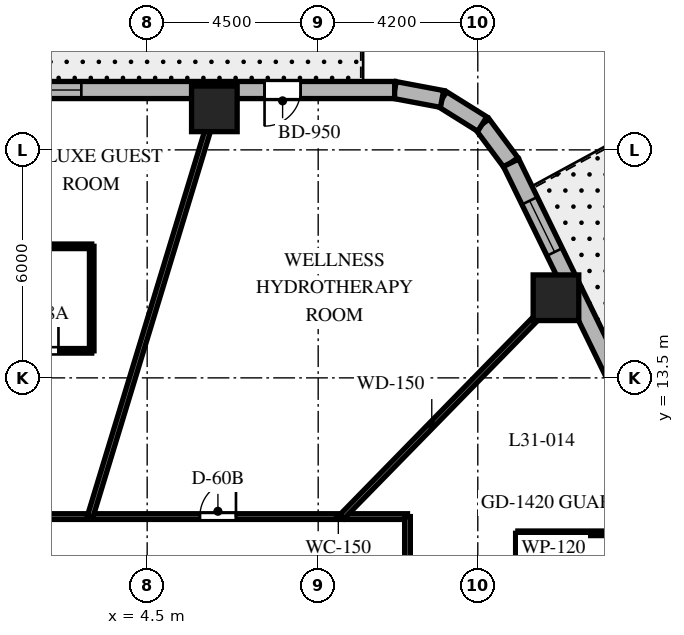
"""IFC4 building model, lengths in metres.
Left out: names, types, materials, properties, quantities, classifications, styles, units other than length and angle.
Written with IfcOpenShell. Run it as: python <this file> out.ifc"""

import sys

from ifc_helpers import new_model, si_unit, direction, frame, frame_2d, origin, origin_2d, place, context, subcontext, project, spatial, rectangle, extrude, element, fill, save


model = new_model("IFC4")
c1 = context("Model", 3, precision=1e-05, world=origin(), true_north=direction((0.0, 1.0)))
c2 = subcontext(c1, "Body", "Model", "MODEL_VIEW")
j1 = project(units=[si_unit("LENGTHUNIT", "METRE"), si_unit("PLANEANGLEUNIT", "RADIAN")], contexts=[c1])
p1 = place(None, origin())
s1 = spatial("IfcSite", under=j1, at=p1, CompositionType="ELEMENT")
p2 = place(p1, origin())
s2 = spatial("IfcBuilding", under=s1, at=p2, CompositionType="ELEMENT")
p3 = place(p2, frame((0.0, 0.0, 128.4)))
s3 = spatial("IfcBuildingStorey", under=s2, at=p3, CompositionType="ELEMENT", Elevation=128.4)
for number, where, z_axis, x_axis in (
    (1, (15.257, 15.609, 0.0), (0.0, 0.0, 1.0), (1.0, 0.0, 0.0)),
    (2, (6.268, 20.58, 0.0), (0.0, 0.0, 1.0), (1.0, 0.0, 0.0)),
):
    element("IfcColumn", number, at=place(p3, frame(where, z_axis=z_axis, x_axis=x_axis)), inside=s3, PredefinedType="COLUMN", context=c2, shape_type="SweptSolid", body=[
        extrude(rectangle(XDim=1.2, YDim=1.2, at=origin_2d()), origin(), (0.0, 0.0, 1.0), 3.7),
    ])
p4 = place(p3, frame((14.076, 19.161, 0.0), z_axis=(0.0, 0.0, 1.0), x_axis=(-0.597226657159, 0.802072515412, 0.0)))
e3 = element("IfcWall", 3, at=p4, inside=s3, PredefinedType="SOLIDWALL", context=c2, shape_type="SweptSolid", body=[
    extrude(rectangle(XDim=1.269, YDim=0.45, at=frame_2d((0.635, 0.0))), origin(), (0.0, 0.0, 1.0), 3.4),
])
p5 = place(p3, frame((13.318, 20.179, 0.0), z_axis=(0.0, 0.0, 1.0), x_axis=(-0.848031272749, 0.529946186362, 0.0)))
e4 = element("IfcWall", 4, at=p5, inside=s3, PredefinedType="SOLIDWALL", context=c2, shape_type="SweptSolid", body=[
    extrude(rectangle(XDim=1.248, YDim=0.45, at=frame_2d((0.624, 0.0))), origin(), (0.0, 0.0, 1.0), 3.4),
])
p6 = place(p3, frame((12.259, 20.84, 0.0), z_axis=(0.0, 0.0, 1.0), x_axis=(-0.982730354425, 0.185043374624, 0.0)))
e5 = element("IfcWall", 5, at=p6, inside=s3, PredefinedType="SOLIDWALL", context=c2, shape_type="SweptSolid", body=[
    extrude(rectangle(XDim=1.269, YDim=0.45, at=frame_2d((0.635, 0.0))), origin(), (0.0, 0.0, 1.0), 3.4),
])
p7 = place(p3, frame((22.238, 2.427, 0.0), z_axis=(0.0, 0.0, 1.0), x_axis=(-0.438374803278, 0.898792262901, 0.0)))
e6 = element("IfcWall", 6, at=p7, inside=s3, PredefinedType="SOLIDWALL", context=c2, shape_type="SweptSolid", body=[
    extrude(rectangle(XDim=18.618, YDim=0.45, at=frame_2d((9.309, 0.0))), origin(), (0.0, 0.0, 1.0), 3.4),
])
p8 = place(p7, frame((4.62, 0.0, 0.0)))
e7 = element("IfcOpeningElement", 7, at=p8, cuts=e6, PredefinedType="OPENING", context=c2, shape_type="SweptSolid", body=[
    extrude(rectangle(XDim=1.0, YDim=2.15, at=frame_2d((0.5, 1.075))), frame((0.0, 0.235, 0.0), z_axis=(0.0, -1.0, 0.0), x_axis=(1.0, 0.0, 0.0)), (0.0, 0.0, 1.0), 0.47),
])
p9 = place(p7, frame((8.61, 0.0, 0.8)))
e8 = element("IfcOpeningElement", 8, at=p9, cuts=e6, PredefinedType="OPENING", context=c2, shape_type="SweptSolid", body=[
    extrude(rectangle(XDim=1.5, YDim=1.8, at=frame_2d((0.75, 0.9))), frame((0.0, 0.235, 0.0), z_axis=(0.0, -1.0, 0.0), x_axis=(1.0, 0.0, 0.0)), (0.0, 0.0, 1.0), 0.47),
])
p10 = place(p7, frame((16.006, 0.0, 0.8)))
e9 = element("IfcOpeningElement", 9, at=p10, cuts=e6, PredefinedType="OPENING", context=c2, shape_type="SweptSolid", body=[
    extrude(rectangle(XDim=1.5, YDim=1.8, at=frame_2d((0.75, 0.9))), frame((0.0, 0.235, 0.0), z_axis=(0.0, -1.0, 0.0), x_axis=(1.0, 0.0, 0.0)), (0.0, 0.0, 1.0), 0.47),
])
p11 = place(p7, frame((1.163, 0.0, 0.8)))
e10 = element("IfcOpeningElement", 10, at=p11, cuts=e6, PredefinedType="OPENING", context=c2, shape_type="SweptSolid", body=[
    extrude(rectangle(XDim=1.5, YDim=1.8, at=frame_2d((0.75, 0.9))), frame((0.0, 0.235, 0.0), z_axis=(0.0, -1.0, 0.0), x_axis=(1.0, 0.0, 0.0)), (0.0, 0.0, 1.0), 0.47),
])
p12 = place(p3, frame((11.012, 21.075, 0.0), z_axis=(0.0, 0.0, 1.0), x_axis=(-1.0, 0.0, 0.0)))
e11 = element("IfcWall", 11, at=p12, inside=s3, PredefinedType="SOLIDWALL", context=c2, shape_type="SweptSolid", body=[
    extrude(rectangle(XDim=23.782, YDim=0.45, at=frame_2d((11.891, 0.0))), origin(), (0.0, 0.0, 1.0), 3.4),
])
p13 = place(p12, frame((2.473, 0.0, 0.0)))
e12 = element("IfcOpeningElement", 12, at=p13, cuts=e11, PredefinedType="OPENING", context=c2, shape_type="SweptSolid", body=[
    extrude(rectangle(XDim=0.95, YDim=2.15, at=frame_2d((0.475, 1.075))), frame((0.0, 0.235, 0.0), z_axis=(0.0, -1.0, 0.0), x_axis=(1.0, 0.0, 0.0)), (0.0, 0.0, 1.0), 0.47),
])
p14 = place(p12, frame((8.244, 0.0, 0.8)))
e13 = element("IfcOpeningElement", 13, at=p14, cuts=e11, PredefinedType="OPENING", context=c2, shape_type="SweptSolid", body=[
    extrude(rectangle(XDim=1.5, YDim=1.8, at=frame_2d((0.75, 0.9))), frame((0.0, 0.235, 0.0), z_axis=(0.0, -1.0, 0.0), x_axis=(1.0, 0.0, 0.0)), (0.0, 0.0, 1.0), 0.47),
])
p15 = place(p12, frame((14.811, 0.0, 0.8)))
e14 = element("IfcOpeningElement", 14, at=p15, cuts=e11, PredefinedType="OPENING", context=c2, shape_type="SweptSolid", body=[
    extrude(rectangle(XDim=1.5, YDim=1.8, at=frame_2d((0.75, 0.9))), frame((0.0, 0.235, 0.0), z_axis=(0.0, -1.0, 0.0), x_axis=(1.0, 0.0, 0.0)), (0.0, 0.0, 1.0), 0.47),
])
p16 = place(p12, frame((20.741, 0.0, 0.8)))
e15 = element("IfcOpeningElement", 15, at=p16, cuts=e11, PredefinedType="OPENING", context=c2, shape_type="SweptSolid", body=[
    extrude(rectangle(XDim=1.5, YDim=1.8, at=frame_2d((0.75, 0.9))), frame((0.0, 0.235, 0.0), z_axis=(0.0, -1.0, 0.0), x_axis=(1.0, 0.0, 0.0)), (0.0, 0.0, 1.0), 0.47),
])
p17 = place(p3, frame((-11.35, 9.85, 0.0), z_axis=(0.0, 0.0, 1.0), x_axis=(1.0, 0.0, 0.0)))
e16 = element("IfcWall", 16, at=p17, inside=s3, PredefinedType="PARTITIONING", context=c2, shape_type="SweptSolid", body=[
    extrude(rectangle(XDim=22.7, YDim=0.15, at=frame_2d((11.35, 0.0))), origin(), (0.0, 0.0, 1.0), 2.84),
])
p18 = place(p17, frame((17.237, 0.0, 0.0)))
e17 = element("IfcOpeningElement", 17, at=p18, cuts=e16, PredefinedType="OPENING", context=c2, shape_type="SweptSolid", body=[
    extrude(rectangle(XDim=0.95, YDim=2.03, at=frame_2d((0.475, 1.015))), frame((0.0, 0.085, 0.0), z_axis=(0.0, -1.0, 0.0), x_axis=(1.0, 0.0, 0.0)), (0.0, 0.0, 1.0), 0.17),
])
p19 = place(p17, frame((11.994, 0.0, 0.0)))
e18 = element("IfcOpeningElement", 18, at=p19, cuts=e16, PredefinedType="OPENING", context=c2, shape_type="SweptSolid", body=[
    extrude(rectangle(XDim=0.95, YDim=2.03, at=frame_2d((0.475, 1.015))), frame((0.0, 0.085, 0.0), z_axis=(0.0, -1.0, 0.0), x_axis=(1.0, 0.0, 0.0)), (0.0, 0.0, 1.0), 0.17),
])
p20 = place(p17, frame((8.559, 0.0, 0.0)))
e19 = element("IfcOpeningElement", 19, at=p20, cuts=e16, PredefinedType="OPENING", context=c2, shape_type="SweptSolid", body=[
    extrude(rectangle(XDim=0.95, YDim=2.03, at=frame_2d((0.475, 1.015))), frame((0.0, 0.085, 0.0), z_axis=(0.0, -1.0, 0.0), x_axis=(1.0, 0.0, 0.0)), (0.0, 0.0, 1.0), 0.17),
])
p21 = place(p17, frame((3.399, 0.0, 0.0)))
e20 = element("IfcOpeningElement", 20, at=p21, cuts=e16, PredefinedType="OPENING", context=c2, shape_type="SweptSolid", body=[
    extrude(rectangle(XDim=0.95, YDim=2.03, at=frame_2d((0.475, 1.015))), frame((0.0, 0.085, 0.0), z_axis=(0.0, -1.0, 0.0), x_axis=(1.0, 0.0, 0.0)), (0.0, 0.0, 1.0), 0.17),
])
p22 = place(p3, frame((11.35, 9.85, 0.0), z_axis=(0.0, 0.0, 1.0), x_axis=(0.0, -1.0, 0.0)))
e21 = element("IfcWall", 21, at=p22, inside=s3, PredefinedType="PARTITIONING", context=c2, shape_type="SweptSolid", body=[
    extrude(rectangle(XDim=19.7, YDim=0.15, at=frame_2d((9.85, 0.0))), origin(), (0.0, 0.0, 1.0), 2.84),
])
p23 = place(p22, frame((3.008, 0.0, 0.0)))
e22 = element("IfcOpeningElement", 22, at=p23, cuts=e21, PredefinedType="OPENING", context=c2, shape_type="SweptSolid", body=[
    extrude(rectangle(XDim=0.95, YDim=2.03, at=frame_2d((0.475, 1.015))), frame((0.0, 0.085, 0.0), z_axis=(0.0, -1.0, 0.0), x_axis=(1.0, 0.0, 0.0)), (0.0, 0.0, 1.0), 0.17),
])
p24 = place(p22, frame((15.205, 0.0, 0.0)))
e23 = element("IfcOpeningElement", 23, at=p24, cuts=e21, PredefinedType="OPENING", context=c2, shape_type="SweptSolid", body=[
    extrude(rectangle(XDim=0.95, YDim=2.03, at=frame_2d((0.475, 1.015))), frame((0.0, 0.085, 0.0), z_axis=(0.0, -1.0, 0.0), x_axis=(1.0, 0.0, 0.0)), (0.0, 0.0, 1.0), 0.17),
])
p25 = place(p22, frame((8.836, 0.0, 0.0)))
e24 = element("IfcOpeningElement", 24, at=p25, cuts=e21, PredefinedType="OPENING", context=c2, shape_type="SweptSolid", body=[
    extrude(rectangle(XDim=0.95, YDim=2.03, at=frame_2d((0.475, 1.015))), frame((0.0, 0.085, 0.0), z_axis=(0.0, -1.0, 0.0), x_axis=(1.0, 0.0, 0.0)), (0.0, 0.0, 1.0), 0.17),
])
p26 = place(p3, frame((9.628, 9.85, 0.0), z_axis=(0.0, 0.0, 1.0), x_axis=(0.698992824326, 0.715128681805, 0.0)))
e25 = element("IfcWall", 25, at=p26, inside=s3, PredefinedType="PARTITIONING", context=c2, shape_type="SweptSolid", body=[
    extrude(rectangle(XDim=8.579, YDim=0.15, at=frame_2d((4.29, 0.0))), origin(), (0.0, 0.0, 1.0), 2.54),
])
p27 = place(p3, frame((3.0, 9.85, 0.0), z_axis=(0.0, 0.0, 1.0), x_axis=(0.291352035382, 0.95661590593, 0.0)))
e26 = element("IfcWall", 26, at=p27, inside=s3, PredefinedType="PARTITIONING", context=c2, shape_type="SweptSolid", body=[
    extrude(rectangle(XDim=11.734, YDim=0.15, at=frame_2d((5.867, 0.0))), origin(), (0.0, 0.0, 1.0), 2.54),
])
p28 = place(p3, frame((16.695, 9.41, 0.0), z_axis=(0.0, 0.0, 1.0), x_axis=(-1.0, 0.0, 0.0)))
e27 = element("IfcWall", 27, at=p28, inside=s3, PredefinedType="PARTITIONING", context=c2, shape_type="SweptSolid", body=[
    extrude(rectangle(XDim=2.44, YDim=0.12, at=frame_2d((1.22, 0.0))), origin(), (0.0, 0.0, 1.0), 2.927),
])
p29 = place(p3, frame((14.255, 9.41, 0.0), z_axis=(0.0, 0.0, 1.0), x_axis=(0.0, -1.0, 0.0)))
e28 = element("IfcWall", 28, at=p29, inside=s3, PredefinedType="PARTITIONING", context=c2, shape_type="SweptSolid", body=[
    extrude(rectangle(XDim=2.61, YDim=0.12, at=frame_2d((1.305, 0.0))), origin(), (0.0, 0.0, 1.0), 3.4),
])
p30 = place(p3, frame((0.441, 14.212, 0.0), z_axis=(0.0, 0.0, 1.0), x_axis=(1.0, 0.0, 0.0)))
e29 = element("IfcWall", 29, at=p30, inside=s3, PredefinedType="PARTITIONING", context=c2, shape_type="SweptSolid", body=[
    extrude(rectangle(XDim=2.6, YDim=0.12, at=frame_2d((1.3, 0.0))), origin(), (0.0, 0.0, 1.0), 3.4),
])
p31 = place(p30, frame((0.875, 0.0, 0.0)))
e30 = element("IfcOpeningElement", 30, at=p31, cuts=e29, PredefinedType="OPENING", context=c2, shape_type="SweptSolid", body=[
    extrude(rectangle(XDim=0.85, YDim=2.03, at=frame_2d((0.425, 1.015))), frame((0.0, 0.07, 0.0), z_axis=(0.0, -1.0, 0.0), x_axis=(1.0, 0.0, 0.0)), (0.0, 0.0, 1.0), 0.14),
])
p32 = place(p3, frame((3.041, 14.212, 0.0), z_axis=(0.0, 0.0, 1.0), x_axis=(0.0, 1.0, 0.0)))
e31 = element("IfcWall", 31, at=p32, inside=s3, PredefinedType="PARTITIONING", context=c2, shape_type="SweptSolid", body=[
    extrude(rectangle(XDim=2.75, YDim=0.12, at=frame_2d((1.375, 0.0))), origin(), (0.0, 0.0, 1.0), 2.841),
])
p33 = place(p3, frame((3.041, 16.962, 0.0), z_axis=(0.0, 0.0, 1.0), x_axis=(-1.0, 0.0, 0.0)))
e32 = element("IfcWall", 32, at=p33, inside=s3, PredefinedType="PARTITIONING", context=c2, shape_type="SweptSolid", body=[
    extrude(rectangle(XDim=2.6, YDim=0.12, at=frame_2d((1.3, 0.0))), origin(), (0.0, 0.0, 1.0), 3.4),
])
p34 = place(p10, origin())
e33 = element("IfcWindow", 33, at=p34, inside=s3, PartitioningType="SINGLE_PANEL", PredefinedType="WINDOW", context=c2, shape_type="SweptSolid", body=[
    extrude(rectangle(XDim=1.5, YDim=1.8, at=frame_2d((0.75, 0.9))), frame((0.0, 0.03, 0.0), z_axis=(0.0, -1.0, 0.0), x_axis=(1.0, 0.0, 0.0)), (0.0, 0.0, 1.0), 0.06),
])
fill(e9, e33)
p35 = place(p13, origin())
e34 = element("IfcDoor", 34, at=p35, inside=s3, OperationType="SINGLE_SWING_RIGHT", PredefinedType="DOOR", context=c2, shape_type="SweptSolid", body=[
    extrude(rectangle(XDim=0.95, YDim=2.15, at=frame_2d((0.475, 1.075))), frame((0.0, 0.025, 0.0), z_axis=(0.0, -1.0, 0.0), x_axis=(1.0, 0.0, 0.0)), (0.0, 0.0, 1.0), 0.05),
])
fill(e12, e34)
p36 = place(p14, origin())
e35 = element("IfcWindow", 35, at=p36, inside=s3, PartitioningType="SINGLE_PANEL", PredefinedType="WINDOW", context=c2, shape_type="SweptSolid", body=[
    extrude(rectangle(XDim=1.5, YDim=1.8, at=frame_2d((0.75, 0.9))), frame((0.0, 0.03, 0.0), z_axis=(0.0, -1.0, 0.0), x_axis=(1.0, 0.0, 0.0)), (0.0, 0.0, 1.0), 0.06),
])
fill(e13, e35)
p37 = place(p18, origin())
e36 = element("IfcDoor", 36, at=p37, inside=s3, OperationType="SINGLE_SWING_RIGHT", PredefinedType="DOOR", context=c2, shape_type="SweptSolid", body=[
    extrude(rectangle(XDim=0.95, YDim=2.03, at=frame_2d((0.475, 1.015))), frame((0.0, 0.025, 0.0), z_axis=(0.0, -1.0, 0.0), x_axis=(1.0, 0.0, 0.0)), (0.0, 0.0, 1.0), 0.05),
])
fill(e17, e36)
p38 = place(p31, origin())
e37 = element("IfcDoor", 37, at=p38, inside=s3, OperationType="SINGLE_SWING_RIGHT", PredefinedType="DOOR", context=c2, shape_type="SweptSolid", body=[
    extrude(rectangle(XDim=0.85, YDim=2.03, at=frame_2d((0.425, 1.015))), frame((0.0, 0.025, 0.0), z_axis=(0.0, -1.0, 0.0), x_axis=(1.0, 0.0, 0.0)), (0.0, 0.0, 1.0), 0.05),
])
fill(e30, e37)
save(model, sys.argv[1])
